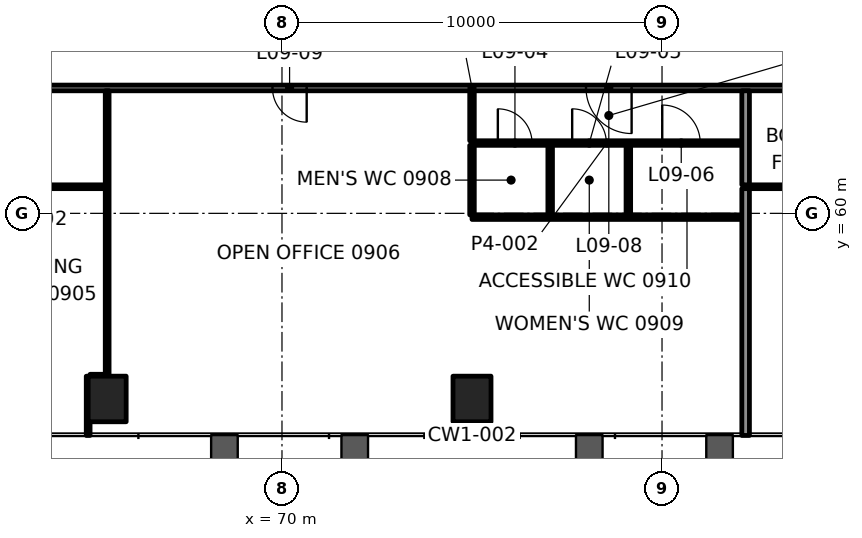
"""IFC4 building model, lengths in metres.
Left out: names, types, materials, properties, quantities, classifications, styles, units other than length and angle.
Written with IfcOpenShell. Run it as: python <this file> out.ifc"""

import sys

from ifc_helpers import new_model, si_unit, direction, frame, frame_2d, origin, origin_2d, place, context, subcontext, project, spatial, rectangle, extrude, element, fill, save


model = new_model("IFC4")
c1 = context("Model", 3, precision=1e-05, world=origin(), true_north=direction((0.0, 1.0)))
c2 = subcontext(c1, "Body", "Model", "MODEL_VIEW")
j1 = project(units=[si_unit("LENGTHUNIT", "METRE"), si_unit("PLANEANGLEUNIT", "RADIAN")], contexts=[c1])
p1 = place(None, origin())
s1 = spatial("IfcSite", under=j1, at=p1, CompositionType="ELEMENT")
p2 = place(p1, origin())
s2 = spatial("IfcBuilding", under=s1, at=p2, CompositionType="ELEMENT")
p3 = place(p2, frame((0.0, 0.0, 44.2)))
s3 = spatial("IfcBuildingStorey", under=s2, at=p3, CompositionType="ELEMENT", Elevation=44.2)
for number, where, z_axis, x_axis in (
    (1, (65.4, 55.115, -0.0), (0.0, 0.0, 1.0), (1.0, 0.0, 0.0)),
    (2, (75.0, 55.115, -0.0), (0.0, 0.0, 1.0), (1.0, 0.0, 0.0)),
):
    element("IfcColumn", number, at=place(p3, frame(where, z_axis=z_axis, x_axis=x_axis)), inside=s3, PredefinedType="COLUMN", context=c2, shape_type="SweptSolid", body=[
        extrude(rectangle(XDim=1.0, YDim=1.2, at=origin_2d()), origin(), (0.0, 0.0, 1.0), 4.2),
    ])
p4 = place(p3, frame((64.95, 55.715, 0.0), z_axis=(0.0, 0.0, 1.0), x_axis=(1.0, 0.0, 0.0)))
e3 = element("IfcWall", 3, at=p4, inside=s3, PredefinedType="PARTITIONING", context=c2, shape_type="SweptSolid", body=[
    extrude(rectangle(XDim=0.399, YDim=0.1, at=frame_2d((0.2, 0.0))), origin(), (0.0, 0.0, 1.0), 3.4),
])
p5 = place(p3, frame((75.0, 59.9, 0.0), z_axis=(0.0, 0.0, 1.0), x_axis=(1.0, 0.0, 0.0)))
e4 = element("IfcWall", 4, at=p5, inside=s3, PredefinedType="PARTITIONING", context=c2, shape_type="SweptSolid", body=[
    extrude(rectangle(XDim=7.1, YDim=0.12, at=frame_2d((3.55, 0.0))), origin(), (0.0, 0.0, 1.0), 3.4),
])
p6 = place(p3, frame((58.25, 60.7, 0.0), z_axis=(0.0, 0.0, 1.0), x_axis=(1.0, 0.0, 0.0)))
e5 = element("IfcWall", 5, at=p6, inside=s3, PredefinedType="PARTITIONING", context=c2, shape_type="SweptSolid", body=[
    extrude(rectangle(XDim=7.1, YDim=0.1, at=frame_2d((3.55, 0.0))), origin(), (0.0, 0.0, 1.0), 3.4),
])
p7 = place(p6, frame((1.427, 0.0, 0.0)))
e6 = element("IfcOpeningElement", 6, at=p7, cuts=e5, PredefinedType="OPENING", context=c2, shape_type="SweptSolid", body=[
    extrude(rectangle(XDim=0.9, YDim=2.1, at=frame_2d((0.45, 1.05))), frame((0.0, 0.06, 0.0), z_axis=(0.0, -1.0, 0.0), x_axis=(1.0, 0.0, 0.0)), (0.0, 0.0, 1.0), 0.12),
])
p8 = place(p6, frame((4.773, 0.0, 0.0)))
e7 = element("IfcOpeningElement", 7, at=p8, cuts=e5, PredefinedType="OPENING", context=c2, shape_type="SweptSolid", body=[
    extrude(rectangle(XDim=0.9, YDim=2.1, at=frame_2d((0.45, 1.05))), frame((0.0, 0.06, 0.0), z_axis=(0.0, -1.0, 0.0), x_axis=(1.0, 0.0, 0.0)), (0.0, 0.0, 1.0), 0.12),
])
p9 = place(p3, frame((82.2, 60.7, 0.0), z_axis=(0.0, 0.0, 1.0), x_axis=(1.0, 0.0, 0.0)))
e8 = element("IfcWall", 8, at=p9, inside=s3, PredefinedType="PARTITIONING", context=c2, shape_type="SweptSolid", body=[
    extrude(rectangle(XDim=10.468, YDim=0.1, at=frame_2d((5.234, 0.0))), origin(), (0.0, 0.0, 1.0), 3.4),
])
p10 = place(p9, frame((4.634, 0.0, 0.0)))
e9 = element("IfcOpeningElement", 9, at=p10, cuts=e8, PredefinedType="OPENING", context=c2, shape_type="SweptSolid", body=[
    extrude(rectangle(XDim=1.2, YDim=2.1, at=frame_2d((0.6, 1.05))), frame((0.0, 0.06, 0.0), z_axis=(0.0, -1.0, 0.0), x_axis=(1.0, 0.0, 0.0)), (0.0, 0.0, 1.0), 0.12),
])
p11 = place(p3, frame((75.0, 61.85, 0.0), z_axis=(0.0, 0.0, 1.0), x_axis=(1.0, 0.0, 0.0)))
e10 = element("IfcWall", 10, at=p11, inside=s3, PredefinedType="PARTITIONING", context=c2, shape_type="SweptSolid", body=[
    extrude(rectangle(XDim=7.1, YDim=0.12, at=frame_2d((3.55, 0.0))), origin(), (0.0, 0.0, 1.0), 3.4),
])
p12 = place(p11, frame((0.68, 0.0, 0.0)))
e11 = element("IfcOpeningElement", 11, at=p12, cuts=e10, PredefinedType="OPENING", context=c2, shape_type="SweptSolid", body=[
    extrude(rectangle(XDim=0.9, YDim=2.1, at=frame_2d((0.45, 1.05))), frame((0.0, 0.07, 0.0), z_axis=(0.0, -1.0, 0.0), x_axis=(1.0, 0.0, 0.0)), (0.0, 0.0, 1.0), 0.14),
])
p13 = place(p11, frame((2.636, 0.0, 0.0)))
e12 = element("IfcOpeningElement", 12, at=p13, cuts=e10, PredefinedType="OPENING", context=c2, shape_type="SweptSolid", body=[
    extrude(rectangle(XDim=0.9, YDim=2.1, at=frame_2d((0.45, 1.05))), frame((0.0, 0.07, 0.0), z_axis=(0.0, -1.0, 0.0), x_axis=(1.0, 0.0, 0.0)), (0.0, 0.0, 1.0), 0.14),
])
p14 = place(p11, frame((5.006, 0.0, 0.0)))
e13 = element("IfcOpeningElement", 13, at=p14, cuts=e10, PredefinedType="OPENING", context=c2, shape_type="SweptSolid", body=[
    extrude(rectangle(XDim=1.0, YDim=2.1, at=frame_2d((0.5, 1.05))), frame((0.0, 0.07, 0.0), z_axis=(0.0, -1.0, 0.0), x_axis=(1.0, 0.0, 0.0)), (0.0, 0.0, 1.0), 0.14),
])
p15 = place(p3, frame((90.7, 63.3, 0.0), z_axis=(0.0, 0.0, 1.0), x_axis=(-1.0, 0.0, 0.0)))
e14 = element("IfcWall", 14, at=p15, inside=s3, PredefinedType="PARTITIONING", context=c2, shape_type="SweptSolid", body=[
    extrude(rectangle(XDim=31.4, YDim=0.15, at=frame_2d((15.7, 0.0))), origin(), (0.0, 0.0, 1.0), 3.4),
])
p16 = place(p15, frame((3.852, 0.0, 0.0)))
e15 = element("IfcOpeningElement", 15, at=p16, cuts=e14, PredefinedType="OPENING", context=c2, shape_type="SweptSolid", body=[
    extrude(rectangle(XDim=1.0, YDim=2.1, at=frame_2d((0.5, 1.05))), frame((0.0, 0.085, 0.0), z_axis=(0.0, -1.0, 0.0), x_axis=(1.0, 0.0, 0.0)), (0.0, 0.0, 1.0), 0.17),
])
p17 = place(p15, frame((11.5, 0.0, 0.0)))
e16 = element("IfcOpeningElement", 16, at=p17, cuts=e14, PredefinedType="OPENING", context=c2, shape_type="SweptSolid", body=[
    extrude(rectangle(XDim=1.2, YDim=2.1, at=frame_2d((0.6, 1.05))), frame((0.0, 0.085, 0.0), z_axis=(0.0, -1.0, 0.0), x_axis=(1.0, 0.0, 0.0)), (0.0, 0.0, 1.0), 0.17),
])
p18 = place(p15, frame((20.05, 0.0, 0.0)))
e17 = element("IfcOpeningElement", 17, at=p18, cuts=e14, PredefinedType="OPENING", context=c2, shape_type="SweptSolid", body=[
    extrude(rectangle(XDim=0.9, YDim=2.1, at=frame_2d((0.45, 1.05))), frame((0.0, 0.085, 0.0), z_axis=(0.0, -1.0, 0.0), x_axis=(1.0, 0.0, 0.0)), (0.0, 0.0, 1.0), 0.17),
])
p19 = place(p15, frame((27.749, 0.0, 0.0)))
e18 = element("IfcOpeningElement", 18, at=p19, cuts=e14, PredefinedType="OPENING", context=c2, shape_type="SweptSolid", body=[
    extrude(rectangle(XDim=1.0, YDim=2.1, at=frame_2d((0.5, 1.05))), frame((0.0, 0.085, 0.0), z_axis=(0.0, -1.0, 0.0), x_axis=(1.0, 0.0, 0.0)), (0.0, 0.0, 1.0), 0.17),
])
p20 = place(p3, frame((82.2, 54.155, 0.0), z_axis=(0.0, 0.0, 1.0), x_axis=(0.0, 1.0, 0.0)))
e19 = element("IfcWall", 19, at=p20, inside=s3, PredefinedType="PARTITIONING", context=c2, shape_type="SweptSolid", body=[
    extrude(rectangle(XDim=6.495, YDim=0.2, at=frame_2d((3.247, 0.0))), origin(), (0.0, 0.0, 1.0), 3.165),
])
for number, where, z_axis, x_axis in (
    (20, (79.114, 59.96, 0.0), (0.0, 0.0, 1.0), (0.0, 1.0, 0.0)),
    (21, (77.057, 59.96, 0.0), (0.0, 0.0, 1.0), (0.0, 1.0, 0.0)),
    (22, (75.0, 59.96, 0.0), (0.0, 0.0, 1.0), (0.0, 1.0, 0.0)),
):
    element("IfcWall", number, at=place(p3, frame(where, z_axis=z_axis, x_axis=x_axis)), inside=s3, PredefinedType="PARTITIONING", context=c2, shape_type="SweptSolid", body=[
        extrude(rectangle(XDim=1.83, YDim=0.12, at=frame_2d((0.915, 0.0))), origin(), (0.0, 0.0, 1.0), 3.4),
    ])
p21 = place(p3, frame((65.4, 55.716, 0.0), z_axis=(0.0, 0.0, 1.0), x_axis=(0.0, 1.0, 0.0)))
e23 = element("IfcWall", 23, at=p21, inside=s3, PredefinedType="PARTITIONING", context=c2, shape_type="SweptSolid", body=[
    extrude(rectangle(XDim=7.509, YDim=0.1, at=frame_2d((3.755, 0.0))), origin(), (0.0, 0.0, 1.0), 3.4),
])
p22 = place(p3, frame((64.9, 54.155, 0.0), z_axis=(0.0, 0.0, 1.0), x_axis=(0.0, 1.0, 0.0)))
e24 = element("IfcWall", 24, at=p22, inside=s3, PredefinedType="PARTITIONING", context=c2, shape_type="SweptSolid", body=[
    extrude(rectangle(XDim=1.56, YDim=0.1, at=frame_2d((0.78, 0.0))), origin(), (0.0, 0.0, 1.0), 3.165),
])
p23 = place(p3, frame((82.2, 60.75, 0.0), z_axis=(0.0, 0.0, 1.0), x_axis=(0.0, 1.0, 0.0)))
e25 = element("IfcWall", 25, at=p23, inside=s3, PredefinedType="PARTITIONING", context=c2, shape_type="SweptSolid", body=[
    extrude(rectangle(XDim=2.475, YDim=0.2, at=frame_2d((1.238, 0.0))), origin(), (0.0, 0.0, 1.0), 3.4),
])
p24 = place(p3, frame((75.0, 61.91, 0.0), z_axis=(0.0, 0.0, 1.0), x_axis=(0.0, 1.0, 0.0)))
e26 = element("IfcWall", 26, at=p24, inside=s3, PredefinedType="PARTITIONING", context=c2, shape_type="SweptSolid", body=[
    extrude(rectangle(XDim=1.315, YDim=0.12, at=frame_2d((0.658, 0.0))), origin(), (0.0, 0.0, 1.0), 3.4),
])
p25 = place(p12, origin())
e27 = element("IfcDoor", 27, at=p25, inside=s3, OperationType="SINGLE_SWING_LEFT", PredefinedType="DOOR", context=c2, shape_type="SweptSolid", body=[
    extrude(rectangle(XDim=0.9, YDim=2.1, at=frame_2d((0.45, 1.05))), frame((0.0, 0.025, 0.0), z_axis=(0.0, -1.0, 0.0), x_axis=(1.0, 0.0, 0.0)), (0.0, 0.0, 1.0), 0.05),
])
fill(e11, e27)
p26 = place(p13, origin())
e28 = element("IfcDoor", 28, at=p26, inside=s3, OperationType="SINGLE_SWING_RIGHT", PredefinedType="DOOR", context=c2, shape_type="SweptSolid", body=[
    extrude(rectangle(XDim=0.9, YDim=2.1, at=frame_2d((0.45, 1.05))), frame((0.0, 0.025, 0.0), z_axis=(0.0, -1.0, 0.0), x_axis=(1.0, 0.0, 0.0)), (0.0, 0.0, 1.0), 0.05),
])
fill(e12, e28)
p27 = place(p14, origin())
e29 = element("IfcDoor", 29, at=p27, inside=s3, OperationType="SINGLE_SWING_LEFT", PredefinedType="DOOR", context=c2, shape_type="SweptSolid", body=[
    extrude(rectangle(XDim=1.0, YDim=2.1, at=frame_2d((0.5, 1.05))), frame((0.0, 0.025, 0.0), z_axis=(0.0, -1.0, 0.0), x_axis=(1.0, 0.0, 0.0)), (0.0, 0.0, 1.0), 0.05),
])
fill(e13, e29)
p28 = place(p17, origin())
e30 = element("IfcDoor", 30, at=p28, inside=s3, OperationType="DOUBLE_DOOR_SINGLE_SWING", PredefinedType="DOOR", context=c2, shape_type="SweptSolid", body=[
    extrude(rectangle(XDim=1.2, YDim=2.1, at=frame_2d((0.6, 1.05))), frame((0.0, 0.025, 0.0), z_axis=(0.0, -1.0, 0.0), x_axis=(1.0, 0.0, 0.0)), (0.0, 0.0, 1.0), 0.05),
])
fill(e16, e30)
p29 = place(p18, origin())
e31 = element("IfcDoor", 31, at=p29, inside=s3, OperationType="SINGLE_SWING_RIGHT", PredefinedType="DOOR", context=c2, shape_type="SweptSolid", body=[
    extrude(rectangle(XDim=0.9, YDim=2.1, at=frame_2d((0.45, 1.05))), frame((0.0, 0.025, 0.0), z_axis=(0.0, -1.0, 0.0), x_axis=(1.0, 0.0, 0.0)), (0.0, 0.0, 1.0), 0.05),
])
fill(e17, e31)
save(model, sys.argv[1])
